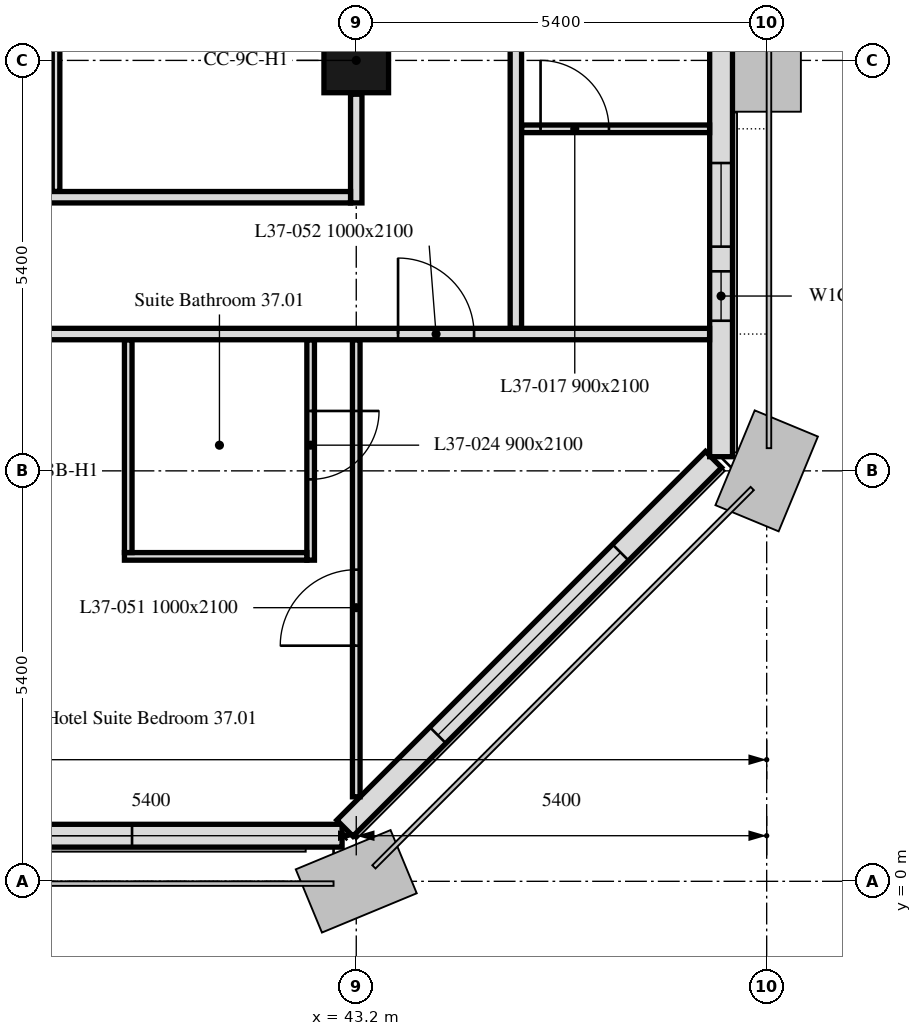
"""IFC4 building model, lengths in metres.
Left out: names, types, materials, properties, quantities, classifications, styles, units other than length and angle.
Written with IfcOpenShell. Run it as: python <this file> out.ifc"""

import sys

from ifc_helpers import new_model, si_unit, direction, frame, frame_2d, origin, origin_2d, place, context, subcontext, project, spatial, rectangle, extrude, element, fill, save


model = new_model("IFC4")
c1 = context("Model", 3, precision=1e-05, world=origin(), true_north=direction((0.0, 1.0)))
c2 = subcontext(c1, "Body", "Model", "MODEL_VIEW")
j1 = project(units=[si_unit("LENGTHUNIT", "METRE"), si_unit("PLANEANGLEUNIT", "RADIAN")], contexts=[c1])
p1 = place(None, origin())
s1 = spatial("IfcSite", under=j1, at=p1, CompositionType="ELEMENT")
p2 = place(p1, origin())
s2 = spatial("IfcBuilding", under=s1, at=p2, CompositionType="ELEMENT")
p3 = place(p2, frame((0.0, 0.0, 159.4)))
s3 = spatial("IfcBuildingStorey", under=s2, at=p3, CompositionType="ELEMENT", Elevation=159.4)
p4 = place(p3, frame((43.2, 10.8, 0.0), z_axis=(0.0, 0.0, 1.0), x_axis=(1.0, 0.0, 0.0)))
e1 = element("IfcColumn", 1, at=p4, inside=s3, PredefinedType="COLUMN", context=c2, shape_type="SweptSolid", body=[
    extrude(rectangle(XDim=0.85, YDim=0.85, at=origin_2d()), origin(), (0.0, 0.0, 1.0), 3.0),
])
p5 = place(p3, frame((10.986, 0.6, 0.0), z_axis=(0.0, 0.0, 1.0), x_axis=(1.0, 0.0, 0.0)))
e2 = element("IfcWall", 2, at=p5, inside=s3, PredefinedType="SOLIDWALL", context=c2, shape_type="SweptSolid", body=[
    extrude(rectangle(XDim=32.027, YDim=0.3, at=frame_2d((16.014, 0.0))), origin(), (0.0, 0.0, 1.0), 3.0),
])
p6 = place(p5, frame((0.814, 0.0, 0.9)))
e3 = element("IfcOpeningElement", 3, at=p6, cuts=e2, PredefinedType="OPENING", context=c2, shape_type="SweptSolid", body=[
    extrude(rectangle(XDim=3.4, YDim=1.7, at=frame_2d((1.7, 0.85))), frame((0.0, 0.16, 0.0), z_axis=(0.0, -1.0, 0.0), x_axis=(1.0, 0.0, 0.0)), (0.0, 0.0, 1.0), 0.32),
])
p7 = place(p5, frame((6.564, 0.0, 0.9)))
e4 = element("IfcOpeningElement", 4, at=p7, cuts=e2, PredefinedType="OPENING", context=c2, shape_type="SweptSolid", body=[
    extrude(rectangle(XDim=1.1, YDim=1.7, at=frame_2d((0.55, 0.85))), frame((0.0, 0.16, 0.0), z_axis=(0.0, -1.0, 0.0), x_axis=(1.0, 0.0, 0.0)), (0.0, 0.0, 1.0), 0.32),
])
p8 = place(p5, frame((11.614, 0.0, 0.9)))
e5 = element("IfcOpeningElement", 5, at=p8, cuts=e2, PredefinedType="OPENING", context=c2, shape_type="SweptSolid", body=[
    extrude(rectangle(XDim=3.4, YDim=1.7, at=frame_2d((1.7, 0.85))), frame((0.0, 0.16, 0.0), z_axis=(0.0, -1.0, 0.0), x_axis=(1.0, 0.0, 0.0)), (0.0, 0.0, 1.0), 0.32),
])
p9 = place(p5, frame((17.364, 0.0, 0.9)))
e6 = element("IfcOpeningElement", 6, at=p9, cuts=e2, PredefinedType="OPENING", context=c2, shape_type="SweptSolid", body=[
    extrude(rectangle(XDim=1.1, YDim=1.7, at=frame_2d((0.55, 0.85))), frame((0.0, 0.16, 0.0), z_axis=(0.0, -1.0, 0.0), x_axis=(1.0, 0.0, 0.0)), (0.0, 0.0, 1.0), 0.32),
])
p10 = place(p5, frame((22.414, 0.0, 0.9)))
e7 = element("IfcOpeningElement", 7, at=p10, cuts=e2, PredefinedType="OPENING", context=c2, shape_type="SweptSolid", body=[
    extrude(rectangle(XDim=3.4, YDim=1.7, at=frame_2d((1.7, 0.85))), frame((0.0, 0.16, 0.0), z_axis=(0.0, -1.0, 0.0), x_axis=(1.0, 0.0, 0.0)), (0.0, 0.0, 1.0), 0.32),
])
p11 = place(p5, frame((28.164, 0.0, 0.9)))
e8 = element("IfcOpeningElement", 8, at=p11, cuts=e2, PredefinedType="OPENING", context=c2, shape_type="SweptSolid", body=[
    extrude(rectangle(XDim=1.1, YDim=1.7, at=frame_2d((0.55, 0.85))), frame((0.0, 0.16, 0.0), z_axis=(0.0, -1.0, 0.0), x_axis=(1.0, 0.0, 0.0)), (0.0, 0.0, 1.0), 0.32),
])
p12 = place(p3, frame((43.051, 0.699, 0.0), z_axis=(0.0, 0.0, 1.0), x_axis=(0.707106781187, 0.707106781187, 0.0)))
e9 = element("IfcWall", 9, at=p12, inside=s3, PredefinedType="SOLIDWALL", context=c2, shape_type="SweptSolid", body=[
    extrude(rectangle(XDim=6.86, YDim=0.3, at=frame_2d((3.43, 0.0))), origin(), (0.0, 0.0, 1.0), 3.0),
])
p13 = place(p12, frame((1.73, 0.0, 0.9)))
e10 = element("IfcOpeningElement", 10, at=p13, cuts=e9, PredefinedType="OPENING", context=c2, shape_type="SweptSolid", body=[
    extrude(rectangle(XDim=3.4, YDim=1.7, at=frame_2d((1.7, 0.85))), frame((0.0, 0.16, 0.0), z_axis=(0.0, -1.0, 0.0), x_axis=(1.0, 0.0, 0.0)), (0.0, 0.0, 1.0), 0.32),
])
p14 = place(p3, frame((48.0, 5.586, 0.0), z_axis=(0.0, 0.0, 1.0), x_axis=(0.0, 1.0, 0.0)))
e11 = element("IfcWall", 11, at=p14, inside=s3, PredefinedType="SOLIDWALL", context=c2, shape_type="SweptSolid", body=[
    extrude(rectangle(XDim=32.027, YDim=0.3, at=frame_2d((16.014, 0.0))), origin(), (0.0, 0.0, 1.0), 3.0),
])
p15 = place(p14, frame((1.789, 0.0, 0.9)))
e12 = element("IfcOpeningElement", 12, at=p15, cuts=e11, PredefinedType="OPENING", context=c2, shape_type="SweptSolid", body=[
    extrude(rectangle(XDim=0.65, YDim=1.7, at=frame_2d((0.325, 0.85))), frame((0.0, 0.16, 0.0), z_axis=(0.0, -1.0, 0.0), x_axis=(1.0, 0.0, 0.0)), (0.0, 0.0, 1.0), 0.32),
])
p16 = place(p14, frame((2.764, 0.0, 0.9)))
e13 = element("IfcOpeningElement", 13, at=p16, cuts=e11, PredefinedType="OPENING", context=c2, shape_type="SweptSolid", body=[
    extrude(rectangle(XDim=1.1, YDim=1.7, at=frame_2d((0.55, 0.85))), frame((0.0, 0.16, 0.0), z_axis=(0.0, -1.0, 0.0), x_axis=(1.0, 0.0, 0.0)), (0.0, 0.0, 1.0), 0.32),
])
p17 = place(p14, frame((6.564, 0.0, 0.9)))
e14 = element("IfcOpeningElement", 14, at=p17, cuts=e11, PredefinedType="OPENING", context=c2, shape_type="SweptSolid", body=[
    extrude(rectangle(XDim=1.1, YDim=1.7, at=frame_2d((0.55, 0.85))), frame((0.0, 0.16, 0.0), z_axis=(0.0, -1.0, 0.0), x_axis=(1.0, 0.0, 0.0)), (0.0, 0.0, 1.0), 0.32),
])
p18 = place(p14, frame((8.164, 0.0, 0.9)))
e15 = element("IfcOpeningElement", 15, at=p18, cuts=e11, PredefinedType="OPENING", context=c2, shape_type="SweptSolid", body=[
    extrude(rectangle(XDim=1.1, YDim=1.7, at=frame_2d((0.55, 0.85))), frame((0.0, 0.16, 0.0), z_axis=(0.0, -1.0, 0.0), x_axis=(1.0, 0.0, 0.0)), (0.0, 0.0, 1.0), 0.32),
])
p19 = place(p14, frame((11.614, 0.0, 0.9)))
e16 = element("IfcOpeningElement", 16, at=p19, cuts=e11, PredefinedType="OPENING", context=c2, shape_type="SweptSolid", body=[
    extrude(rectangle(XDim=3.4, YDim=1.7, at=frame_2d((1.7, 0.85))), frame((0.0, 0.16, 0.0), z_axis=(0.0, -1.0, 0.0), x_axis=(1.0, 0.0, 0.0)), (0.0, 0.0, 1.0), 0.32),
])
p20 = place(p14, frame((17.364, 0.0, 0.9)))
e17 = element("IfcOpeningElement", 17, at=p20, cuts=e11, PredefinedType="OPENING", context=c2, shape_type="SweptSolid", body=[
    extrude(rectangle(XDim=1.1, YDim=1.7, at=frame_2d((0.55, 0.85))), frame((0.0, 0.16, 0.0), z_axis=(0.0, -1.0, 0.0), x_axis=(1.0, 0.0, 0.0)), (0.0, 0.0, 1.0), 0.32),
])
p21 = place(p14, frame((18.964, 0.0, 0.9)))
e18 = element("IfcOpeningElement", 18, at=p21, cuts=e11, PredefinedType="OPENING", context=c2, shape_type="SweptSolid", body=[
    extrude(rectangle(XDim=1.1, YDim=1.7, at=frame_2d((0.55, 0.85))), frame((0.0, 0.16, 0.0), z_axis=(0.0, -1.0, 0.0), x_axis=(1.0, 0.0, 0.0)), (0.0, 0.0, 1.0), 0.32),
])
p22 = place(p14, frame((22.414, 0.0, 0.9)))
e19 = element("IfcOpeningElement", 19, at=p22, cuts=e11, PredefinedType="OPENING", context=c2, shape_type="SweptSolid", body=[
    extrude(rectangle(XDim=3.4, YDim=1.7, at=frame_2d((1.7, 0.85))), frame((0.0, 0.16, 0.0), z_axis=(0.0, -1.0, 0.0), x_axis=(1.0, 0.0, 0.0)), (0.0, 0.0, 1.0), 0.32),
])
p23 = place(p14, frame((28.164, 0.0, 0.9)))
e20 = element("IfcOpeningElement", 20, at=p23, cuts=e11, PredefinedType="OPENING", context=c2, shape_type="SweptSolid", body=[
    extrude(rectangle(XDim=1.1, YDim=1.7, at=frame_2d((0.55, 0.85))), frame((0.0, 0.16, 0.0), z_axis=(0.0, -1.0, 0.0), x_axis=(1.0, 0.0, 0.0)), (0.0, 0.0, 1.0), 0.32),
])
p24 = place(p14, frame((29.764, 0.0, 0.9)))
e21 = element("IfcOpeningElement", 21, at=p24, cuts=e11, PredefinedType="OPENING", context=c2, shape_type="SweptSolid", body=[
    extrude(rectangle(XDim=1.1, YDim=1.7, at=frame_2d((0.55, 0.85))), frame((0.0, 0.16, 0.0), z_axis=(0.0, -1.0, 0.0), x_axis=(1.0, 0.0, 0.0)), (0.0, 0.0, 1.0), 0.32),
])
p25 = place(p3, frame((45.375, 9.9, 0.0), z_axis=(0.0, 0.0, 1.0), x_axis=(1.0, 0.0, 0.0)))
e22 = element("IfcWall", 22, at=p25, inside=s3, PredefinedType="PARTITIONING", context=c2, shape_type="SweptSolid", body=[
    extrude(rectangle(XDim=2.474, YDim=0.1, at=frame_2d((1.237, 0.0))), origin(), (0.0, 0.0, 1.0), 3.0),
])
p26 = place(p25, frame((0.25, 0.0, 0.0)))
e23 = element("IfcOpeningElement", 23, at=p26, cuts=e22, PredefinedType="OPENING", context=c2, shape_type="SweptSolid", body=[
    extrude(rectangle(XDim=0.9, YDim=2.1, at=frame_2d((0.45, 1.05))), frame((0.0, 0.05, 0.0), z_axis=(0.0, -1.0, 0.0), x_axis=(1.0, 0.0, 0.0)), (0.0, 0.0, 1.0), 0.1),
])
p27 = place(p3, frame((45.3, 21.525, 0.0), z_axis=(0.0, 0.0, 1.0), x_axis=(0.0, -1.0, 0.0)))
e24 = element("IfcWall", 24, at=p27, inside=s3, PredefinedType="PARTITIONING", context=c2, shape_type="SweptSolid", body=[
    extrude(rectangle(XDim=14.25, YDim=0.15, at=frame_2d((7.125, 0.0))), origin(), (0.0, 0.0, 1.0), 2.4),
])
p28 = place(p27, frame((2.125, 0.0, 0.0)))
e25 = element("IfcOpeningElement", 25, at=p28, cuts=e24, PredefinedType="OPENING", context=c2, shape_type="SweptSolid", body=[
    extrude(rectangle(XDim=1.0, YDim=2.1, at=frame_2d((0.5, 1.05))), frame((0.0, 0.075, 0.0), z_axis=(0.0, -1.0, 0.0), x_axis=(1.0, 0.0, 0.0)), (0.0, 0.0, 1.0), 0.15),
])
p29 = place(p27, frame((7.975, 0.0, 0.0)))
e26 = element("IfcOpeningElement", 26, at=p29, cuts=e24, PredefinedType="OPENING", context=c2, shape_type="SweptSolid", body=[
    extrude(rectangle(XDim=1.0, YDim=2.1, at=frame_2d((0.5, 1.05))), frame((0.0, 0.075, 0.0), z_axis=(0.0, -1.0, 0.0), x_axis=(1.0, 0.0, 0.0)), (0.0, 0.0, 1.0), 0.15),
])
p30 = place(p3, frame((43.2, 1.112, 0.0), z_axis=(0.0, 0.0, 1.0), x_axis=(0.0, 1.0, 0.0)))
e27 = element("IfcWall", 27, at=p30, inside=s3, PredefinedType="PARTITIONING", context=c2, shape_type="SweptSolid", body=[
    extrude(rectangle(XDim=6.013, YDim=0.1, at=frame_2d((3.006, 0.0))), origin(), (0.0, 0.0, 1.0), 3.0),
])
p31 = place(p30, frame((1.988, 0.0, 0.0)))
e28 = element("IfcOpeningElement", 28, at=p31, cuts=e27, PredefinedType="OPENING", context=c2, shape_type="SweptSolid", body=[
    extrude(rectangle(XDim=1.0, YDim=2.1, at=frame_2d((0.5, 1.05))), frame((0.0, 0.05, 0.0), z_axis=(0.0, -1.0, 0.0), x_axis=(1.0, 0.0, 0.0)), (0.0, 0.0, 1.0), 0.1),
])
p32 = place(p3, frame((42.6, 7.125, 0.0), z_axis=(0.0, 0.0, 1.0), x_axis=(0.0, -1.0, 0.0)))
e29 = element("IfcWall", 29, at=p32, inside=s3, PredefinedType="PARTITIONING", context=c2, shape_type="SweptSolid", body=[
    extrude(rectangle(XDim=2.9, YDim=0.1, at=frame_2d((1.45, 0.0))), origin(), (0.0, 0.0, 1.0), 3.0),
])
p33 = place(p32, frame((0.937, 0.0, 0.0)))
e30 = element("IfcOpeningElement", 30, at=p33, cuts=e29, PredefinedType="OPENING", context=c2, shape_type="SweptSolid", body=[
    extrude(rectangle(XDim=0.9, YDim=2.1, at=frame_2d((0.45, 1.05))), frame((0.0, 0.05, 0.0), z_axis=(0.0, -1.0, 0.0), x_axis=(1.0, 0.0, 0.0)), (0.0, 0.0, 1.0), 0.1),
])
p34 = place(p3, frame((42.55, 4.275, 0.0), z_axis=(0.0, 0.0, 1.0), x_axis=(-1.0, 0.0, 0.0)))
e31 = element("IfcWall", 31, at=p34, inside=s3, PredefinedType="PARTITIONING", context=c2, shape_type="SweptSolid", body=[
    extrude(rectangle(XDim=2.4, YDim=0.1, at=frame_2d((1.2, 0.0))), origin(), (0.0, 0.0, 1.0), 3.0),
])
p35 = place(p3, frame((40.2, 4.325, 0.0), z_axis=(0.0, 0.0, 1.0), x_axis=(0.0, 1.0, 0.0)))
e32 = element("IfcWall", 32, at=p35, inside=s3, PredefinedType="PARTITIONING", context=c2, shape_type="SweptSolid", body=[
    extrude(rectangle(XDim=2.8, YDim=0.1, at=frame_2d((1.4, 0.0))), origin(), (0.0, 0.0, 1.0), 3.0),
])
p36 = place(p3, frame((6.151, 7.2, 0.0), z_axis=(0.0, 0.0, 1.0), x_axis=(1.0, 0.0, 0.0)))
e33 = element("IfcWall", 33, at=p36, inside=s3, PredefinedType="PARTITIONING", context=c2, shape_type="SweptSolid", body=[
    extrude(rectangle(XDim=41.698, YDim=0.15, at=frame_2d((20.849, 0.0))), origin(), (0.0, 0.0, 1.0), 2.4),
])
p37 = place(p36, frame((2.249, 0.0, 0.0)))
e34 = element("IfcOpeningElement", 34, at=p37, cuts=e33, PredefinedType="OPENING", context=c2, shape_type="SweptSolid", body=[
    extrude(rectangle(XDim=1.0, YDim=2.1, at=frame_2d((0.5, 1.05))), frame((0.0, 0.075, 0.0), z_axis=(0.0, -1.0, 0.0), x_axis=(1.0, 0.0, 0.0)), (0.0, 0.0, 1.0), 0.15),
])
p38 = place(p36, frame((7.649, 0.0, 0.0)))
e35 = element("IfcOpeningElement", 35, at=p38, cuts=e33, PredefinedType="OPENING", context=c2, shape_type="SweptSolid", body=[
    extrude(rectangle(XDim=1.0, YDim=2.1, at=frame_2d((0.5, 1.05))), frame((0.0, 0.075, 0.0), z_axis=(0.0, -1.0, 0.0), x_axis=(1.0, 0.0, 0.0)), (0.0, 0.0, 1.0), 0.15),
])
p39 = place(p36, frame((13.049, 0.0, 0.0)))
e36 = element("IfcOpeningElement", 36, at=p39, cuts=e33, PredefinedType="OPENING", context=c2, shape_type="SweptSolid", body=[
    extrude(rectangle(XDim=1.0, YDim=2.1, at=frame_2d((0.5, 1.05))), frame((0.0, 0.075, 0.0), z_axis=(0.0, -1.0, 0.0), x_axis=(1.0, 0.0, 0.0)), (0.0, 0.0, 1.0), 0.15),
])
p40 = place(p36, frame((18.449, 0.0, 0.0)))
e37 = element("IfcOpeningElement", 37, at=p40, cuts=e33, PredefinedType="OPENING", context=c2, shape_type="SweptSolid", body=[
    extrude(rectangle(XDim=1.0, YDim=2.1, at=frame_2d((0.5, 1.05))), frame((0.0, 0.075, 0.0), z_axis=(0.0, -1.0, 0.0), x_axis=(1.0, 0.0, 0.0)), (0.0, 0.0, 1.0), 0.15),
])
p41 = place(p36, frame((23.849, 0.0, 0.0)))
e38 = element("IfcOpeningElement", 38, at=p41, cuts=e33, PredefinedType="OPENING", context=c2, shape_type="SweptSolid", body=[
    extrude(rectangle(XDim=1.0, YDim=2.1, at=frame_2d((0.5, 1.05))), frame((0.0, 0.075, 0.0), z_axis=(0.0, -1.0, 0.0), x_axis=(1.0, 0.0, 0.0)), (0.0, 0.0, 1.0), 0.15),
])
p42 = place(p36, frame((29.249, 0.0, 0.0)))
e39 = element("IfcOpeningElement", 39, at=p42, cuts=e33, PredefinedType="OPENING", context=c2, shape_type="SweptSolid", body=[
    extrude(rectangle(XDim=1.0, YDim=2.1, at=frame_2d((0.5, 1.05))), frame((0.0, 0.075, 0.0), z_axis=(0.0, -1.0, 0.0), x_axis=(1.0, 0.0, 0.0)), (0.0, 0.0, 1.0), 0.15),
])
p43 = place(p36, frame((37.599, 0.0, 0.0)))
e40 = element("IfcOpeningElement", 40, at=p43, cuts=e33, PredefinedType="OPENING", context=c2, shape_type="SweptSolid", body=[
    extrude(rectangle(XDim=1.0, YDim=2.1, at=frame_2d((0.5, 1.05))), frame((0.0, 0.075, 0.0), z_axis=(0.0, -1.0, 0.0), x_axis=(1.0, 0.0, 0.0)), (0.0, 0.0, 1.0), 0.15),
])
p44 = place(p3, frame((39.25, 9.075, 0.0), z_axis=(0.0, 0.0, 1.0), x_axis=(0.0, 1.0, 0.0)))
e41 = element("IfcWall", 41, at=p44, inside=s3, PredefinedType="PARTITIONING", context=c2, shape_type="SweptSolid", body=[
    extrude(rectangle(XDim=7.125, YDim=0.1, at=frame_2d((3.562, 0.0))), origin(), (0.0, 0.0, 1.0), 2.4),
])
p45 = place(p3, frame((43.2, 10.355, 0.0), z_axis=(0.0, 0.0, 1.0), x_axis=(0.0, -1.0, 0.0)))
e42 = element("IfcWall", 42, at=p45, inside=s3, PredefinedType="PARTITIONING", context=c2, shape_type="SweptSolid", body=[
    extrude(rectangle(XDim=1.43, YDim=0.15, at=frame_2d((0.715, 0.0))), origin(), (0.0, 0.0, 1.0), 3.0),
])
p46 = place(p3, frame((6.151, 9.0, 0.0), z_axis=(0.0, 0.0, 1.0), x_axis=(1.0, 0.0, 0.0)))
e43 = element("IfcWall", 43, at=p46, inside=s3, PredefinedType="PARTITIONING", context=c2, shape_type="SweptSolid", body=[
    extrude(rectangle(XDim=36.974, YDim=0.15, at=frame_2d((18.487, 0.0))), origin(), (0.0, 0.0, 1.0), 2.4),
])
p47 = place(p46, frame((1.214, 0.0, 0.0)))
e44 = element("IfcOpeningElement", 44, at=p47, cuts=e43, PredefinedType="OPENING", context=c2, shape_type="SweptSolid", body=[
    extrude(rectangle(XDim=1.0, YDim=2.1, at=frame_2d((0.5, 1.05))), frame((0.0, 0.075, 0.0), z_axis=(0.0, -1.0, 0.0), x_axis=(1.0, 0.0, 0.0)), (0.0, 0.0, 1.0), 0.15),
])
p48 = place(p46, frame((28.199, 0.0, 0.0)))
e45 = element("IfcOpeningElement", 45, at=p48, cuts=e43, PredefinedType="OPENING", context=c2, shape_type="SweptSolid", body=[
    extrude(rectangle(XDim=1.0, YDim=2.1, at=frame_2d((0.5, 1.05))), frame((0.0, 0.075, 0.0), z_axis=(0.0, -1.0, 0.0), x_axis=(1.0, 0.0, 0.0)), (0.0, 0.0, 1.0), 0.15),
])
p49 = place(p46, frame((7.099, 0.0, 0.0)))
e46 = element("IfcOpeningElement", 46, at=p49, cuts=e43, PredefinedType="OPENING", context=c2, shape_type="SweptSolid", body=[
    extrude(rectangle(XDim=1.0, YDim=2.1, at=frame_2d((0.5, 1.05))), frame((0.0, 0.075, 0.0), z_axis=(0.0, -1.0, 0.0), x_axis=(1.0, 0.0, 0.0)), (0.0, 0.0, 1.0), 0.15),
])
p50 = place(p46, frame((13.049, 0.0, 0.0)))
e47 = element("IfcOpeningElement", 47, at=p50, cuts=e43, PredefinedType="OPENING", context=c2, shape_type="SweptSolid", body=[
    extrude(rectangle(XDim=1.0, YDim=2.1, at=frame_2d((0.5, 1.05))), frame((0.0, 0.075, 0.0), z_axis=(0.0, -1.0, 0.0), x_axis=(1.0, 0.0, 0.0)), (0.0, 0.0, 1.0), 0.15),
])
p51 = place(p46, frame((16.849, 0.0, 0.0)))
e48 = element("IfcOpeningElement", 48, at=p51, cuts=e43, PredefinedType="OPENING", context=c2, shape_type="SweptSolid", body=[
    extrude(rectangle(XDim=1.0, YDim=2.1, at=frame_2d((0.5, 1.05))), frame((0.0, 0.075, 0.0), z_axis=(0.0, -1.0, 0.0), x_axis=(1.0, 0.0, 0.0)), (0.0, 0.0, 1.0), 0.15),
])
p52 = place(p46, frame((23.849, 0.0, 0.0)))
e49 = element("IfcOpeningElement", 49, at=p52, cuts=e43, PredefinedType="OPENING", context=c2, shape_type="SweptSolid", body=[
    extrude(rectangle(XDim=1.0, YDim=2.1, at=frame_2d((0.5, 1.05))), frame((0.0, 0.075, 0.0), z_axis=(0.0, -1.0, 0.0), x_axis=(1.0, 0.0, 0.0)), (0.0, 0.0, 1.0), 0.15),
])
p53 = place(p46, frame((4.829, 0.0, 0.0)))
e50 = element("IfcOpeningElement", 50, at=p53, cuts=e43, PredefinedType="OPENING", context=c2, shape_type="SweptSolid", body=[
    extrude(rectangle(XDim=1.8, YDim=2.4, at=frame_2d((0.9, 1.2))), frame((0.0, 0.075, 0.0), z_axis=(0.0, -1.0, 0.0), x_axis=(1.0, 0.0, 0.0)), (0.0, 0.0, 1.0), 0.15),
])
p54 = place(p46, frame((30.199, 0.0, 0.0)))
e51 = element("IfcOpeningElement", 51, at=p54, cuts=e43, PredefinedType="OPENING", context=c2, shape_type="SweptSolid", body=[
    extrude(rectangle(XDim=1.0, YDim=2.1, at=frame_2d((0.5, 1.05))), frame((0.0, 0.075, 0.0), z_axis=(0.0, -1.0, 0.0), x_axis=(1.0, 0.0, 0.0)), (0.0, 0.0, 1.0), 0.15),
])
p55 = place(p11, origin())
e52 = element("IfcWindow", 52, at=p55, inside=s3, PartitioningType="SINGLE_PANEL", PredefinedType="WINDOW", context=c2, shape_type="SweptSolid", body=[
    extrude(rectangle(XDim=1.1, YDim=1.7, at=frame_2d((0.55, 0.85))), frame((0.0, 0.03, 0.0), z_axis=(0.0, -1.0, 0.0), x_axis=(1.0, 0.0, 0.0)), (0.0, 0.0, 1.0), 0.06),
])
fill(e8, e52)
p56 = place(p13, origin())
e53 = element("IfcWindow", 53, at=p56, inside=s3, PartitioningType="SINGLE_PANEL", PredefinedType="WINDOW", context=c2, shape_type="SweptSolid", body=[
    extrude(rectangle(XDim=3.4, YDim=1.7, at=frame_2d((1.7, 0.85))), frame((0.0, 0.03, 0.0), z_axis=(0.0, -1.0, 0.0), x_axis=(1.0, 0.0, 0.0)), (0.0, 0.0, 1.0), 0.06),
])
fill(e10, e53)
p57 = place(p15, origin())
e54 = element("IfcWindow", 54, at=p57, inside=s3, PartitioningType="SINGLE_PANEL", PredefinedType="WINDOW", context=c2, shape_type="SweptSolid", body=[
    extrude(rectangle(XDim=0.65, YDim=1.7, at=frame_2d((0.325, 0.85))), frame((0.0, 0.03, 0.0), z_axis=(0.0, -1.0, 0.0), x_axis=(1.0, 0.0, 0.0)), (0.0, 0.0, 1.0), 0.06),
])
fill(e12, e54)
p58 = place(p16, origin())
e55 = element("IfcWindow", 55, at=p58, inside=s3, PartitioningType="SINGLE_PANEL", PredefinedType="WINDOW", context=c2, shape_type="SweptSolid", body=[
    extrude(rectangle(XDim=1.1, YDim=1.7, at=frame_2d((0.55, 0.85))), frame((0.0, 0.03, 0.0), z_axis=(0.0, -1.0, 0.0), x_axis=(1.0, 0.0, 0.0)), (0.0, 0.0, 1.0), 0.06),
])
fill(e13, e55)
p59 = place(p26, origin())
e56 = element("IfcDoor", 56, at=p59, inside=s3, OperationType="SINGLE_SWING_RIGHT", PredefinedType="DOOR", context=c2, shape_type="SweptSolid", body=[
    extrude(rectangle(XDim=0.9, YDim=2.1, at=frame_2d((0.45, 1.05))), frame((0.0, 0.025, 0.0), z_axis=(0.0, -1.0, 0.0), x_axis=(1.0, 0.0, 0.0)), (0.0, 0.0, 1.0), 0.05),
])
fill(e23, e56)
p60 = place(p33, origin())
e57 = element("IfcDoor", 57, at=p60, inside=s3, OperationType="SINGLE_SWING_RIGHT", PredefinedType="DOOR", context=c2, shape_type="SweptSolid", body=[
    extrude(rectangle(XDim=0.9, YDim=2.1, at=frame_2d((0.45, 1.05))), frame((0.0, 0.025, 0.0), z_axis=(0.0, -1.0, 0.0), x_axis=(1.0, 0.0, 0.0)), (0.0, 0.0, 1.0), 0.05),
])
fill(e30, e57)
p61 = place(p31, origin())
e58 = element("IfcDoor", 58, at=p61, inside=s3, OperationType="SINGLE_SWING_RIGHT", PredefinedType="DOOR", context=c2, shape_type="SweptSolid", body=[
    extrude(rectangle(XDim=1.0, YDim=2.1, at=frame_2d((0.5, 1.05))), frame((0.0, 0.025, 0.0), z_axis=(0.0, -1.0, 0.0), x_axis=(1.0, 0.0, 0.0)), (0.0, 0.0, 1.0), 0.05),
])
fill(e28, e58)
p62 = place(p43, origin())
e59 = element("IfcDoor", 59, at=p62, inside=s3, OperationType="SINGLE_SWING_LEFT", PredefinedType="DOOR", context=c2, shape_type="SweptSolid", body=[
    extrude(rectangle(XDim=1.0, YDim=2.1, at=frame_2d((0.5, 1.05))), frame((0.0, 0.025, 0.0), z_axis=(0.0, -1.0, 0.0), x_axis=(1.0, 0.0, 0.0)), (0.0, 0.0, 1.0), 0.05),
])
fill(e40, e59)
save(model, sys.argv[1])
